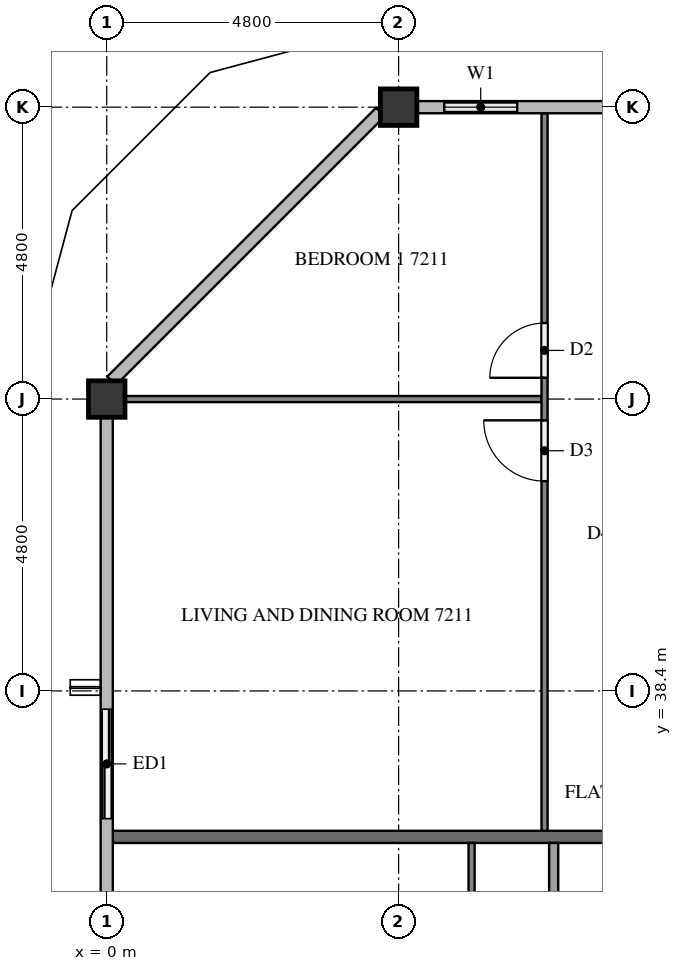
"""IFC4 building model, lengths in metres.
Left out: names, types, materials, properties, quantities, classifications, styles, units other than length and angle.
Written with IfcOpenShell. Run it as: python <this file> out.ifc"""

import sys

from ifc_helpers import new_model, si_unit, direction, frame, frame_2d, origin, origin_2d, place, context, subcontext, project, spatial, rectangle, extrude, element, fill, save


model = new_model("IFC4")
c1 = context("Model", 3, precision=1e-05, world=origin(), true_north=direction((0.0, 1.0)))
c2 = subcontext(c1, "Body", "Model", "MODEL_VIEW")
j1 = project(units=[si_unit("LENGTHUNIT", "METRE"), si_unit("PLANEANGLEUNIT", "RADIAN")], contexts=[c1])
p1 = place(None, origin())
s1 = spatial("IfcSite", under=j1, at=p1, CompositionType="ELEMENT")
p2 = place(p1, origin())
s2 = spatial("IfcBuilding", under=s1, at=p2, CompositionType="ELEMENT")
p3 = place(p2, frame((0.0, 0.0, 275.6)))
s3 = spatial("IfcBuildingStorey", under=s2, at=p3, CompositionType="ELEMENT", Elevation=275.6)
for number, where, z_axis, x_axis in (
    (1, (4.8, 48.0, 0.0), (0.0, 0.0, 1.0), (1.0, 0.0, 0.0)),
    (2, (0.0, 43.2, 0.0), (0.0, 0.0, 1.0), (1.0, 0.0, 0.0)),
):
    element("IfcColumn", number, at=place(p3, frame(where, z_axis=z_axis, x_axis=x_axis)), inside=s3, PredefinedType="COLUMN", context=c2, shape_type="SweptSolid", body=[
        extrude(rectangle(XDim=0.6, YDim=0.6, at=origin_2d()), origin(), (0.0, 0.0, 1.0), 3.2),
    ])
p4 = place(p3, frame((7.2, 48.0, 0.0), z_axis=(0.0, 0.0, 1.0), x_axis=(-1.0, 0.0, 0.0)))
e3 = element("IfcWall", 3, at=p4, inside=s3, PredefinedType="SOLIDWALL", context=c2, shape_type="SweptSolid", body=[
    extrude(rectangle(XDim=2.1, YDim=0.15, at=frame_2d((1.05, 0.0))), origin(), (0.0, 0.0, 1.0), 3.2),
])
p5 = place(p4, frame((0.45, 0.0, 0.9)))
e4 = element("IfcOpeningElement", 4, at=p5, cuts=e3, PredefinedType="OPENING", context=c2, shape_type="SweptSolid", body=[
    extrude(rectangle(XDim=1.2, YDim=1.4, at=frame_2d((0.6, 0.7))), frame((0.0, 0.085, 0.0), z_axis=(0.0, -1.0, 0.0), x_axis=(1.0, 0.0, 0.0)), (0.0, 0.0, 1.0), 0.17),
])
p6 = place(p3, frame((0.0, 38.4, 0.0), z_axis=(0.0, 0.0, 1.0), x_axis=(0.0, -1.0, 0.0)))
e5 = element("IfcWall", 5, at=p6, inside=s3, PredefinedType="SOLIDWALL", context=c2, shape_type="SweptSolid", body=[
    extrude(rectangle(XDim=2.4, YDim=0.15, at=frame_2d((1.2, 0.0))), origin(), (0.0, 0.0, 1.0), 3.2),
])
p7 = place(p6, frame((0.3, 0.0, 0.0)))
e6 = element("IfcOpeningElement", 6, at=p7, cuts=e5, PredefinedType="OPENING", context=c2, shape_type="SweptSolid", body=[
    extrude(rectangle(XDim=1.8, YDim=2.4, at=frame_2d((0.9, 1.2))), frame((0.0, 0.085, 0.0), z_axis=(0.0, -1.0, 0.0), x_axis=(1.0, 0.0, 0.0)), (0.0, 0.0, 1.0), 0.17),
])
p8 = place(p3, frame((0.1, 36.0, 0.0), z_axis=(0.0, 0.0, 1.0), x_axis=(1.0, 0.0, 0.0)))
e7 = element("IfcWall", 7, at=p8, inside=s3, PredefinedType="PARTITIONING", context=c2, shape_type="SweptSolid", body=[
    extrude(rectangle(XDim=11.8, YDim=0.2, at=frame_2d((5.9, 0.0))), origin(), (0.0, 0.0, 1.0), 3.2),
])
p9 = place(p3, frame((7.15, 43.2, 0.0), z_axis=(0.0, 0.0, 1.0), x_axis=(-1.0, 0.0, 0.0)))
e8 = element("IfcWall", 8, at=p9, inside=s3, PredefinedType="PARTITIONING", context=c2, shape_type="SweptSolid", body=[
    extrude(rectangle(XDim=6.85, YDim=0.1, at=frame_2d((3.425, 0.0))), origin(), (0.0, 0.0, 1.0), 3.2),
])
p10 = place(p3, frame((7.2, 36.1, 0.0), z_axis=(0.0, 0.0, 1.0), x_axis=(0.0, 1.0, 0.0)))
e9 = element("IfcWall", 9, at=p10, inside=s3, PredefinedType="PARTITIONING", context=c2, shape_type="SweptSolid", body=[
    extrude(rectangle(XDim=11.8, YDim=0.1, at=frame_2d((5.9, 0.0))), origin(), (0.0, 0.0, 1.0), 3.2),
])
p11 = place(p10, frame((5.75, 0.0, 0.0)))
e10 = element("IfcOpeningElement", 10, at=p11, cuts=e9, PredefinedType="OPENING", context=c2, shape_type="SweptSolid", body=[
    extrude(rectangle(XDim=1.0, YDim=2.1, at=frame_2d((0.5, 1.05))), frame((0.0, 0.06, 0.0), z_axis=(0.0, -1.0, 0.0), x_axis=(1.0, 0.0, 0.0)), (0.0, 0.0, 1.0), 0.12),
])
p12 = place(p10, frame((7.45, 0.0, 0.0)))
e11 = element("IfcOpeningElement", 11, at=p12, cuts=e9, PredefinedType="OPENING", context=c2, shape_type="SweptSolid", body=[
    extrude(rectangle(XDim=0.9, YDim=2.1, at=frame_2d((0.45, 1.05))), frame((0.0, 0.06, 0.0), z_axis=(0.0, -1.0, 0.0), x_axis=(1.0, 0.0, 0.0)), (0.0, 0.0, 1.0), 0.12),
])
p13 = place(p3, frame((6.0, 26.5, 0.0), z_axis=(0.0, 0.0, 1.0), x_axis=(0.0, 1.0, 0.0)))
e12 = element("IfcWall", 12, at=p13, inside=s3, PredefinedType="PARTITIONING", context=c2, shape_type="SweptSolid", body=[
    extrude(rectangle(XDim=9.4, YDim=0.1, at=frame_2d((4.7, 0.0))), origin(), (0.0, 0.0, 1.0), 3.2),
])
p14 = place(p13, frame((3.35, 0.0, 0.0)))
e13 = element("IfcOpeningElement", 13, at=p14, cuts=e12, PredefinedType="OPENING", context=c2, shape_type="SweptSolid", body=[
    extrude(rectangle(XDim=1.0, YDim=2.1, at=frame_2d((0.5, 1.05))), frame((0.0, 0.06, 0.0), z_axis=(0.0, -1.0, 0.0), x_axis=(1.0, 0.0, 0.0)), (0.0, 0.0, 1.0), 0.12),
])
p15 = place(p13, frame((5.05, 0.0, 0.0)))
e14 = element("IfcOpeningElement", 14, at=p15, cuts=e12, PredefinedType="OPENING", context=c2, shape_type="SweptSolid", body=[
    extrude(rectangle(XDim=0.9, YDim=2.1, at=frame_2d((0.45, 1.05))), frame((0.0, 0.06, 0.0), z_axis=(0.0, -1.0, 0.0), x_axis=(1.0, 0.0, 0.0)), (0.0, 0.0, 1.0), 0.12),
])
p16 = place(p3, frame((7.35, 35.9, 0.0), z_axis=(0.0, 0.0, 1.0), x_axis=(0.0, -1.0, 0.0)))
e15 = element("IfcWall", 15, at=p16, inside=s3, PredefinedType="PARTITIONING", context=c2, shape_type="SweptSolid", body=[
    extrude(rectangle(XDim=7.925, YDim=0.15, at=frame_2d((3.962, 0.0))), origin(), (0.0, 0.0, 1.0), 3.2),
])
p17 = place(p16, frame((3.495, 0.0, 0.0)))
e16 = element("IfcOpeningElement", 16, at=p17, cuts=e15, PredefinedType="OPENING", context=c2, shape_type="SweptSolid", body=[
    extrude(rectangle(XDim=0.9, YDim=2.1, at=frame_2d((0.45, 1.05))), frame((0.0, 0.085, 0.0), z_axis=(0.0, -1.0, 0.0), x_axis=(1.0, 0.0, 0.0)), (0.0, 0.0, 1.0), 0.17),
])
p18 = place(p16, frame((2.045, 0.0, 0.0)))
e17 = element("IfcOpeningElement", 17, at=p18, cuts=e15, PredefinedType="OPENING", context=c2, shape_type="SweptSolid", body=[
    extrude(rectangle(XDim=0.8, YDim=2.1, at=frame_2d((0.4, 1.05))), frame((0.0, 0.085, 0.0), z_axis=(0.0, -1.0, 0.0), x_axis=(1.0, 0.0, 0.0)), (0.0, 0.0, 1.0), 0.17),
])
p19 = place(p5, origin())
e18 = element("IfcWindow", 18, at=p19, inside=s3, PartitioningType="SINGLE_PANEL", PredefinedType="WINDOW", context=c2, shape_type="SweptSolid", body=[
    extrude(rectangle(XDim=1.2, YDim=1.4, at=frame_2d((0.6, 0.7))), frame((0.0, 0.03, 0.0), z_axis=(0.0, -1.0, 0.0), x_axis=(1.0, 0.0, 0.0)), (0.0, 0.0, 1.0), 0.06),
])
fill(e4, e18)
p20 = place(p7, origin())
e19 = element("IfcDoor", 19, at=p20, inside=s3, OperationType="SLIDING_TO_LEFT", PredefinedType="DOOR", context=c2, shape_type="SweptSolid", body=[
    extrude(rectangle(XDim=1.8, YDim=2.4, at=frame_2d((0.9, 1.2))), frame((0.0, 0.025, 0.0), z_axis=(0.0, -1.0, 0.0), x_axis=(1.0, 0.0, 0.0)), (0.0, 0.0, 1.0), 0.05),
])
fill(e6, e19)
p21 = place(p11, origin())
e20 = element("IfcDoor", 20, at=p21, inside=s3, OperationType="SINGLE_SWING_RIGHT", PredefinedType="DOOR", context=c2, shape_type="SweptSolid", body=[
    extrude(rectangle(XDim=1.0, YDim=2.1, at=frame_2d((0.5, 1.05))), frame((0.0, 0.025, 0.0), z_axis=(0.0, -1.0, 0.0), x_axis=(1.0, 0.0, 0.0)), (0.0, 0.0, 1.0), 0.05),
])
fill(e10, e20)
p22 = place(p12, origin())
e21 = element("IfcDoor", 21, at=p22, inside=s3, OperationType="SINGLE_SWING_LEFT", PredefinedType="DOOR", context=c2, shape_type="SweptSolid", body=[
    extrude(rectangle(XDim=0.9, YDim=2.1, at=frame_2d((0.45, 1.05))), frame((0.0, 0.025, 0.0), z_axis=(0.0, -1.0, 0.0), x_axis=(1.0, 0.0, 0.0)), (0.0, 0.0, 1.0), 0.05),
])
fill(e11, e21)
save(model, sys.argv[1])
